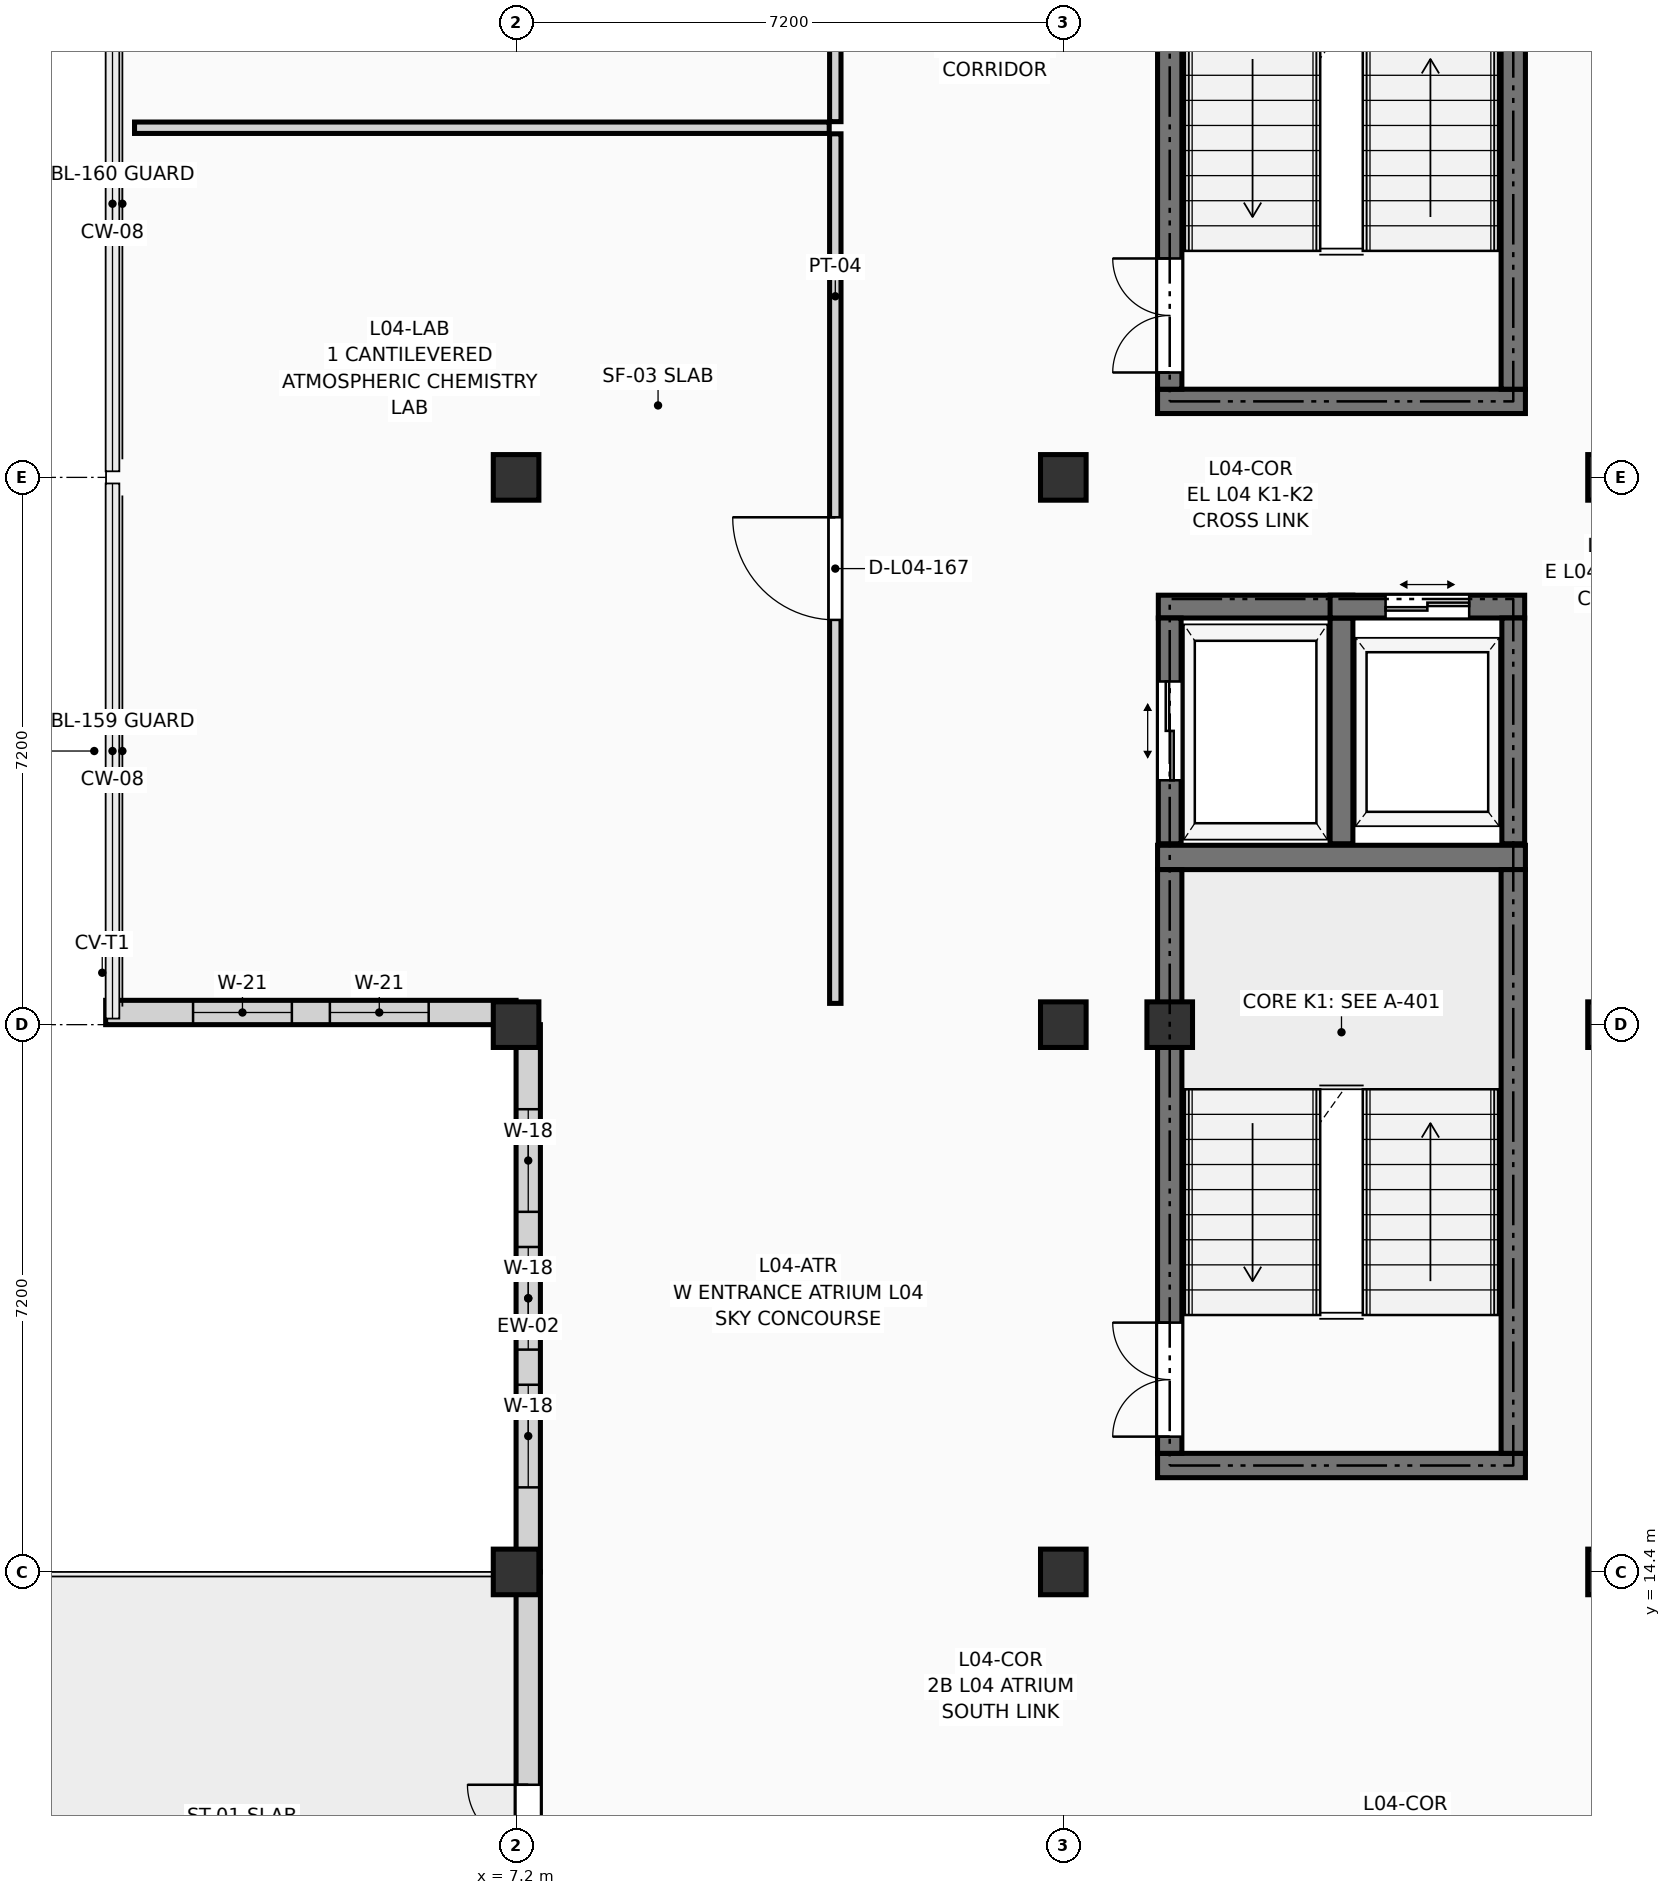
"""IFC4 building model, lengths in metres.
Left out: names, types, materials, properties, quantities, classifications, styles, units other than length and angle.
Written with IfcOpenShell. Run it as: python <this file> out.ifc"""

import sys

from ifc_helpers import new_model, si_unit, direction, frame, frame_2d, origin, origin_2d, place, context, subcontext, project, spatial, rectangle, extrude, element, fill, save


model = new_model("IFC4")
c1 = context("Model", 3, precision=1e-05, world=origin(), true_north=direction((0.0, 1.0)))
c2 = subcontext(c1, "Body", "Model", "MODEL_VIEW")
j1 = project(units=[si_unit("LENGTHUNIT", "METRE"), si_unit("PLANEANGLEUNIT", "RADIAN")], contexts=[c1])
p1 = place(None, origin())
s1 = spatial("IfcSite", under=j1, at=p1, CompositionType="ELEMENT")
p2 = place(p1, origin())
s2 = spatial("IfcBuilding", under=s1, at=p2, CompositionType="ELEMENT")
p3 = place(p2, frame((0.0, 0.0, 15.75)))
s3 = spatial("IfcBuildingStorey", under=s2, at=p3, CompositionType="ELEMENT", Elevation=15.75)
for number, where, z_axis, x_axis in (
    (1, (7.2, 14.4, 0.0), (0.0, 0.0, 1.0), (1.0, 0.0, 0.0)),
    (2, (7.2, 21.6, 0.0), (0.0, 0.0, 1.0), (1.0, 0.0, 0.0)),
    (3, (7.2, 28.8, 0.0), (0.0, 0.0, 1.0), (1.0, 0.0, 0.0)),
    (4, (14.4, 14.4, 0.0), (0.0, 0.0, 1.0), (1.0, 0.0, 0.0)),
    (5, (14.4, 21.6, 0.0), (0.0, 0.0, 1.0), (1.0, 0.0, 0.0)),
    (6, (14.4, 28.8, 0.0), (0.0, 0.0, 1.0), (1.0, 0.0, 0.0)),
    (7, (15.8, 21.6, 0.0), (0.0, 0.0, 1.0), (1.0, 0.0, 0.0)),
    (8, (21.6, 14.4, 0.0), (0.0, 0.0, 1.0), (1.0, 0.0, 0.0)),
    (9, (21.6, 21.6, 0.0), (0.0, 0.0, 1.0), (1.0, 0.0, 0.0)),
    (10, (21.6, 28.8, 0.0), (0.0, 0.0, 1.0), (1.0, 0.0, 0.0)),
):
    element("IfcColumn", number, at=place(p3, frame(where, z_axis=z_axis, x_axis=x_axis)), inside=s3, PredefinedType="COLUMN", context=c2, shape_type="SweptSolid", body=[
        extrude(rectangle(XDim=0.6, YDim=0.6, at=origin_2d()), origin(), (0.0, 0.0, 1.0), 3.6),
    ])
p4 = place(p3, frame((7.36, 7.2, 0.0), z_axis=(0.0, 0.0, 1.0), x_axis=(0.0, 1.0, 0.0)))
e11 = element("IfcWall", 11, at=p4, inside=s3, PredefinedType="SOLIDWALL", context=c2, shape_type="SweptSolid", body=[
    extrude(rectangle(XDim=7.2, YDim=0.32, at=frame_2d((3.6, 0.0))), origin(), (0.0, 0.0, 1.0), 2.84),
])
p5 = place(p4, frame((2.8, 0.0, 0.0)))
e12 = element("IfcOpeningElement", 12, at=p5, cuts=e11, PredefinedType="OPENING", context=c2, shape_type="SweptSolid", body=[
    extrude(rectangle(XDim=1.6, YDim=2.25, at=frame_2d((0.8, 1.125))), frame((0.0, 0.172, 0.0), z_axis=(0.0, -1.0, 0.0), x_axis=(1.0, 0.0, 0.0)), (0.0, 0.0, 1.0), 0.344),
])
p6 = place(p3, frame((7.36, 14.4, 0.0), z_axis=(0.0, 0.0, 1.0), x_axis=(0.0, 1.0, 0.0)))
e13 = element("IfcWall", 13, at=p6, inside=s3, PredefinedType="SOLIDWALL", context=c2, shape_type="SweptSolid", body=[
    extrude(rectangle(XDim=7.2, YDim=0.32, at=frame_2d((3.6, 0.0))), origin(), (0.0, 0.0, 1.0), 2.84),
])
p7 = place(p6, frame((1.113, 0.0, 0.18)))
e14 = element("IfcOpeningElement", 14, at=p7, cuts=e13, PredefinedType="OPENING", context=c2, shape_type="SweptSolid", body=[
    extrude(rectangle(XDim=1.35, YDim=2.45, at=frame_2d((0.675, 1.225))), frame((0.0, 0.172, 0.0), z_axis=(0.0, -1.0, 0.0), x_axis=(1.0, 0.0, 0.0)), (0.0, 0.0, 1.0), 0.344),
])
p8 = place(p6, frame((2.925, 0.0, 0.18)))
e15 = element("IfcOpeningElement", 15, at=p8, cuts=e13, PredefinedType="OPENING", context=c2, shape_type="SweptSolid", body=[
    extrude(rectangle(XDim=1.35, YDim=2.45, at=frame_2d((0.675, 1.225))), frame((0.0, 0.172, 0.0), z_axis=(0.0, -1.0, 0.0), x_axis=(1.0, 0.0, 0.0)), (0.0, 0.0, 1.0), 0.344),
])
p9 = place(p6, frame((4.738, 0.0, 0.18)))
e16 = element("IfcOpeningElement", 16, at=p9, cuts=e13, PredefinedType="OPENING", context=c2, shape_type="SweptSolid", body=[
    extrude(rectangle(XDim=1.35, YDim=2.45, at=frame_2d((0.675, 1.225))), frame((0.0, 0.172, 0.0), z_axis=(0.0, -1.0, 0.0), x_axis=(1.0, 0.0, 0.0)), (0.0, 0.0, 1.0), 0.344),
])
p10 = place(p3, frame((1.8, 21.76, 0.0), z_axis=(0.0, 0.0, 1.0), x_axis=(1.0, 0.0, 0.0)))
e17 = element("IfcWall", 17, at=p10, inside=s3, PredefinedType="SOLIDWALL", context=c2, shape_type="SweptSolid", body=[
    extrude(rectangle(XDim=5.4, YDim=0.32, at=frame_2d((2.7, 0.0))), origin(), (0.0, 0.0, 1.0), 2.696),
])
p11 = place(p10, frame((1.15, 0.0, 0.18)))
e18 = element("IfcOpeningElement", 18, at=p11, cuts=e17, PredefinedType="OPENING", context=c2, shape_type="SweptSolid", body=[
    extrude(rectangle(XDim=1.3, YDim=2.35, at=frame_2d((0.65, 1.175))), frame((0.0, 0.172, 0.0), z_axis=(0.0, -1.0, 0.0), x_axis=(1.0, 0.0, 0.0)), (0.0, 0.0, 1.0), 0.344),
])
p12 = place(p10, frame((2.95, 0.0, 0.18)))
e19 = element("IfcOpeningElement", 19, at=p12, cuts=e17, PredefinedType="OPENING", context=c2, shape_type="SweptSolid", body=[
    extrude(rectangle(XDim=1.3, YDim=2.35, at=frame_2d((0.65, 1.175))), frame((0.0, 0.172, 0.0), z_axis=(0.0, -1.0, 0.0), x_axis=(1.0, 0.0, 0.0)), (0.0, 0.0, 1.0), 0.344),
])
for number, where, z_axis, x_axis in (
    (20, (15.64, 15.8, 0.0), (0.0, 0.0, 1.0), (1.0, 0.0, 0.0)),
    (21, (15.64, 23.8, 0.0), (0.0, 0.0, 1.0), (1.0, 0.0, 0.0)),
):
    element("IfcWall", number, at=place(p3, frame(where, z_axis=z_axis, x_axis=x_axis)), inside=s3, PredefinedType="SHEAR", context=c2, shape_type="SweptSolid", body=[
        extrude(rectangle(XDim=4.84, YDim=0.32, at=frame_2d((2.42, 0.0))), origin(), (0.0, 0.0, 1.0), 3.39),
    ])
p13 = place(p3, frame((15.8, 15.96, 0.0), z_axis=(0.0, 0.0, 1.0), x_axis=(0.0, 1.0, 0.0)))
e22 = element("IfcWall", 22, at=p13, inside=s3, PredefinedType="SHEAR", context=c2, shape_type="SweptSolid", body=[
    extrude(rectangle(XDim=7.68, YDim=0.32, at=frame_2d((3.84, 0.0))), origin(), (0.0, 0.0, 1.0), 3.39),
])
p14 = place(p13, frame((0.22, 0.0, 0.0)))
e23 = element("IfcOpeningElement", 23, at=p14, cuts=e22, PredefinedType="OPENING", context=c2, shape_type="SweptSolid", body=[
    extrude(rectangle(XDim=1.5, YDim=2.2, at=frame_2d((0.75, 1.1))), frame((0.0, 0.172, 0.0), z_axis=(0.0, -1.0, 0.0), x_axis=(1.0, 0.0, 0.0)), (0.0, 0.0, 1.0), 0.344),
])
p15 = place(p3, frame((20.32, 15.96, 0.0), z_axis=(0.0, 0.0, 1.0), x_axis=(0.0, 1.0, 0.0)))
e24 = element("IfcWall", 24, at=p15, inside=s3, PredefinedType="SHEAR", context=c2, shape_type="SweptSolid", body=[
    extrude(rectangle(XDim=7.68, YDim=0.32, at=frame_2d((3.84, 0.0))), origin(), (0.0, 0.0, 1.0), 3.39),
])
p16 = place(p3, frame((15.64, 29.8, 0.0), z_axis=(0.0, 0.0, 1.0), x_axis=(1.0, 0.0, 0.0)))
e25 = element("IfcWall", 25, at=p16, inside=s3, PredefinedType="SHEAR", context=c2, shape_type="SweptSolid", body=[
    extrude(rectangle(XDim=4.84, YDim=0.32, at=frame_2d((2.42, 0.0))), origin(), (0.0, 0.0, 1.0), 3.39),
])
p17 = place(p3, frame((15.8, 29.96, 0.0), z_axis=(0.0, 0.0, 1.0), x_axis=(0.0, 1.0, 0.0)))
e26 = element("IfcWall", 26, at=p17, inside=s3, PredefinedType="SHEAR", context=c2, shape_type="SweptSolid", body=[
    extrude(rectangle(XDim=7.68, YDim=0.32, at=frame_2d((3.84, 0.0))), origin(), (0.0, 0.0, 1.0), 3.39),
])
p18 = place(p17, frame((0.22, 0.0, 0.0)))
e27 = element("IfcOpeningElement", 27, at=p18, cuts=e26, PredefinedType="OPENING", context=c2, shape_type="SweptSolid", body=[
    extrude(rectangle(XDim=1.5, YDim=2.2, at=frame_2d((0.75, 1.1))), frame((0.0, 0.172, 0.0), z_axis=(0.0, -1.0, 0.0), x_axis=(1.0, 0.0, 0.0)), (0.0, 0.0, 1.0), 0.344),
])
p19 = place(p3, frame((20.32, 29.96, 0.0), z_axis=(0.0, 0.0, 1.0), x_axis=(0.0, 1.0, 0.0)))
e28 = element("IfcWall", 28, at=p19, inside=s3, PredefinedType="SHEAR", context=c2, shape_type="SweptSolid", body=[
    extrude(rectangle(XDim=7.68, YDim=0.32, at=frame_2d((3.84, 0.0))), origin(), (0.0, 0.0, 1.0), 3.39),
])
p20 = place(p3, frame((15.65, 27.1, 0.0), z_axis=(0.0, 0.0, 1.0), x_axis=(1.0, 0.0, 0.0)))
e29 = element("IfcWall", 29, at=p20, inside=s3, PredefinedType="SHEAR", context=c2, shape_type="SweptSolid", body=[
    extrude(rectangle(XDim=2.56, YDim=0.3, at=frame_2d((1.28, 0.0))), origin(), (0.0, 0.0, 1.0), 3.39),
])
p21 = place(p3, frame((15.8, 23.98, 0.0), z_axis=(0.0, 0.0, 1.0), x_axis=(0.0, 1.0, 0.0)))
e30 = element("IfcWall", 30, at=p21, inside=s3, PredefinedType="SHEAR", context=c2, shape_type="SweptSolid", body=[
    extrude(rectangle(XDim=2.97, YDim=0.3, at=frame_2d((1.485, 0.0))), origin(), (0.0, 0.0, 1.0), 3.39),
])
p22 = place(p21, frame((0.835, 0.0, 0.0)))
e31 = element("IfcOpeningElement", 31, at=p22, cuts=e30, PredefinedType="OPENING", context=c2, shape_type="SweptSolid", body=[
    extrude(rectangle(XDim=1.3, YDim=2.25, at=frame_2d((0.65, 1.125))), frame((0.0, 0.162, 0.0), z_axis=(0.0, -1.0, 0.0), x_axis=(1.0, 0.0, 0.0)), (0.0, 0.0, 1.0), 0.324),
])
p23 = place(p3, frame((18.06, 23.98, 0.0), z_axis=(0.0, 0.0, 1.0), x_axis=(0.0, 1.0, 0.0)))
e32 = element("IfcWall", 32, at=p23, inside=s3, PredefinedType="SHEAR", context=c2, shape_type="SweptSolid", body=[
    extrude(rectangle(XDim=2.97, YDim=0.3, at=frame_2d((1.485, 0.0))), origin(), (0.0, 0.0, 1.0), 3.39),
])
p24 = place(p3, frame((17.91, 27.1, 0.0), z_axis=(0.0, 0.0, 1.0), x_axis=(1.0, 0.0, 0.0)))
e33 = element("IfcWall", 33, at=p24, inside=s3, PredefinedType="SHEAR", context=c2, shape_type="SweptSolid", body=[
    extrude(rectangle(XDim=2.56, YDim=0.3, at=frame_2d((1.28, 0.0))), origin(), (0.0, 0.0, 1.0), 3.39),
])
p25 = place(p24, frame((0.73, 0.0, 0.0)))
e34 = element("IfcOpeningElement", 34, at=p25, cuts=e33, PredefinedType="OPENING", context=c2, shape_type="SweptSolid", body=[
    extrude(rectangle(XDim=1.1, YDim=2.2, at=frame_2d((0.55, 1.1))), frame((0.0, 0.162, 0.0), z_axis=(0.0, -1.0, 0.0), x_axis=(1.0, 0.0, 0.0)), (0.0, 0.0, 1.0), 0.324),
])
p26 = place(p3, frame((20.32, 23.98, 0.0), z_axis=(0.0, 0.0, 1.0), x_axis=(0.0, 1.0, 0.0)))
e35 = element("IfcWall", 35, at=p26, inside=s3, PredefinedType="SHEAR", context=c2, shape_type="SweptSolid", body=[
    extrude(rectangle(XDim=2.97, YDim=0.3, at=frame_2d((1.485, 0.0))), origin(), (0.0, 0.0, 1.0), 3.39),
])
p27 = place(p3, frame((11.4, 21.88, 0.0), z_axis=(0.0, 0.0, 1.0), x_axis=(0.0, 1.0, 0.0)))
e36 = element("IfcWall", 36, at=p27, inside=s3, PredefinedType="PARTITIONING", context=c2, shape_type="SweptSolid", body=[
    extrude(rectangle(XDim=11.44, YDim=0.15, at=frame_2d((5.72, 0.0))), origin(), (0.0, 0.0, 1.0), 3.375),
])
p28 = place(p27, frame((5.045, 0.0, 0.0)))
e37 = element("IfcOpeningElement", 37, at=p28, cuts=e36, PredefinedType="OPENING", context=c2, shape_type="SweptSolid", body=[
    extrude(rectangle(XDim=1.35, YDim=2.2, at=frame_2d((0.675, 1.1))), frame((0.0, 0.087, 0.0), z_axis=(0.0, -1.0, 0.0), x_axis=(1.0, 0.0, 0.0)), (0.0, 0.0, 1.0), 0.174),
])
p29 = place(p3, frame((2.18, 33.4, 0.0), z_axis=(0.0, 0.0, 1.0), x_axis=(1.0, 0.0, 0.0)))
e38 = element("IfcWall", 38, at=p29, inside=s3, PredefinedType="PARTITIONING", context=c2, shape_type="SweptSolid", body=[
    extrude(rectangle(XDim=9.14, YDim=0.15, at=frame_2d((4.57, 0.0))), origin(), (0.0, 0.0, 1.0), 3.375),
])
p30 = place(p3, frame((11.4, 33.48, 0.0), z_axis=(0.0, 0.0, 1.0), x_axis=(0.0, 1.0, 0.0)))
e39 = element("IfcWall", 39, at=p30, inside=s3, PredefinedType="PARTITIONING", context=c2, shape_type="SweptSolid", body=[
    extrude(rectangle(XDim=11.24, YDim=0.15, at=frame_2d((5.62, 0.0))), origin(), (0.0, 0.0, 1.0), 3.375),
])
p31 = place(p30, frame((4.945, 0.0, 0.0)))
e40 = element("IfcOpeningElement", 40, at=p31, cuts=e39, PredefinedType="OPENING", context=c2, shape_type="SweptSolid", body=[
    extrude(rectangle(XDim=1.35, YDim=2.2, at=frame_2d((0.675, 1.1))), frame((0.0, 0.087, 0.0), z_axis=(0.0, -1.0, 0.0), x_axis=(1.0, 0.0, 0.0)), (0.0, 0.0, 1.0), 0.174),
])
p32 = place(p5, origin())
e41 = element("IfcDoor", 41, at=p32, inside=s3, OperationType="DOUBLE_DOOR_SINGLE_SWING", PredefinedType="DOOR", context=c2, shape_type="SweptSolid", body=[
    extrude(rectangle(XDim=1.6, YDim=2.25, at=frame_2d((0.8, 1.125))), frame((0.0, 0.025, 0.0), z_axis=(0.0, -1.0, 0.0), x_axis=(1.0, 0.0, 0.0)), (0.0, 0.0, 1.0), 0.05),
])
fill(e12, e41)
p33 = place(p7, origin())
e42 = element("IfcWindow", 42, at=p33, inside=s3, PartitioningType="SINGLE_PANEL", PredefinedType="WINDOW", context=c2, shape_type="SweptSolid", body=[
    extrude(rectangle(XDim=1.35, YDim=2.45, at=frame_2d((0.675, 1.225))), frame((0.0, 0.03, 0.0), z_axis=(0.0, -1.0, 0.0), x_axis=(1.0, 0.0, 0.0)), (0.0, 0.0, 1.0), 0.06),
])
fill(e14, e42)
p34 = place(p8, origin())
e43 = element("IfcWindow", 43, at=p34, inside=s3, PartitioningType="SINGLE_PANEL", PredefinedType="WINDOW", context=c2, shape_type="SweptSolid", body=[
    extrude(rectangle(XDim=1.35, YDim=2.45, at=frame_2d((0.675, 1.225))), frame((0.0, 0.03, 0.0), z_axis=(0.0, -1.0, 0.0), x_axis=(1.0, 0.0, 0.0)), (0.0, 0.0, 1.0), 0.06),
])
fill(e15, e43)
p35 = place(p9, origin())
e44 = element("IfcWindow", 44, at=p35, inside=s3, PartitioningType="SINGLE_PANEL", PredefinedType="WINDOW", context=c2, shape_type="SweptSolid", body=[
    extrude(rectangle(XDim=1.35, YDim=2.45, at=frame_2d((0.675, 1.225))), frame((0.0, 0.03, 0.0), z_axis=(0.0, -1.0, 0.0), x_axis=(1.0, 0.0, 0.0)), (0.0, 0.0, 1.0), 0.06),
])
fill(e16, e44)
p36 = place(p11, origin())
e45 = element("IfcWindow", 45, at=p36, inside=s3, PartitioningType="SINGLE_PANEL", PredefinedType="WINDOW", context=c2, shape_type="SweptSolid", body=[
    extrude(rectangle(XDim=1.3, YDim=2.35, at=frame_2d((0.65, 1.175))), frame((0.0, 0.03, 0.0), z_axis=(0.0, -1.0, 0.0), x_axis=(1.0, 0.0, 0.0)), (0.0, 0.0, 1.0), 0.06),
])
fill(e18, e45)
p37 = place(p12, origin())
e46 = element("IfcWindow", 46, at=p37, inside=s3, PartitioningType="SINGLE_PANEL", PredefinedType="WINDOW", context=c2, shape_type="SweptSolid", body=[
    extrude(rectangle(XDim=1.3, YDim=2.35, at=frame_2d((0.65, 1.175))), frame((0.0, 0.03, 0.0), z_axis=(0.0, -1.0, 0.0), x_axis=(1.0, 0.0, 0.0)), (0.0, 0.0, 1.0), 0.06),
])
fill(e19, e46)
p38 = place(p14, origin())
e47 = element("IfcDoor", 47, at=p38, inside=s3, OperationType="DOUBLE_DOOR_SINGLE_SWING", PredefinedType="DOOR", context=c2, shape_type="SweptSolid", body=[
    extrude(rectangle(XDim=1.5, YDim=2.2, at=frame_2d((0.75, 1.1))), frame((0.0, 0.025, 0.0), z_axis=(0.0, -1.0, 0.0), x_axis=(1.0, 0.0, 0.0)), (0.0, 0.0, 1.0), 0.05),
])
fill(e23, e47)
p39 = place(p18, origin())
e48 = element("IfcDoor", 48, at=p39, inside=s3, OperationType="DOUBLE_DOOR_SINGLE_SWING", PredefinedType="DOOR", context=c2, shape_type="SweptSolid", body=[
    extrude(rectangle(XDim=1.5, YDim=2.2, at=frame_2d((0.75, 1.1))), frame((0.0, 0.025, 0.0), z_axis=(0.0, -1.0, 0.0), x_axis=(1.0, 0.0, 0.0)), (0.0, 0.0, 1.0), 0.05),
])
fill(e27, e48)
p40 = place(p22, origin())
e49 = element("IfcDoor", 49, at=p40, inside=s3, OperationType="DOUBLE_DOOR_SLIDING", PredefinedType="DOOR", context=c2, shape_type="SweptSolid", body=[
    extrude(rectangle(XDim=1.3, YDim=2.25, at=frame_2d((0.65, 1.125))), frame((0.0, 0.025, 0.0), z_axis=(0.0, -1.0, 0.0), x_axis=(1.0, 0.0, 0.0)), (0.0, 0.0, 1.0), 0.05),
])
fill(e31, e49)
p41 = place(p25, origin())
e50 = element("IfcDoor", 50, at=p41, inside=s3, OperationType="DOUBLE_DOOR_SLIDING", PredefinedType="DOOR", context=c2, shape_type="SweptSolid", body=[
    extrude(rectangle(XDim=1.1, YDim=2.2, at=frame_2d((0.55, 1.1))), frame((0.0, 0.025, 0.0), z_axis=(0.0, -1.0, 0.0), x_axis=(1.0, 0.0, 0.0)), (0.0, 0.0, 1.0), 0.05),
])
fill(e34, e50)
p42 = place(p28, origin())
e51 = element("IfcDoor", 51, at=p42, inside=s3, OperationType="SINGLE_SWING_RIGHT", PredefinedType="DOOR", context=c2, shape_type="SweptSolid", body=[
    extrude(rectangle(XDim=1.35, YDim=2.2, at=frame_2d((0.675, 1.1))), frame((0.0, 0.025, 0.0), z_axis=(0.0, -1.0, 0.0), x_axis=(1.0, 0.0, 0.0)), (0.0, 0.0, 1.0), 0.05),
])
fill(e37, e51)
save(model, sys.argv[1])
